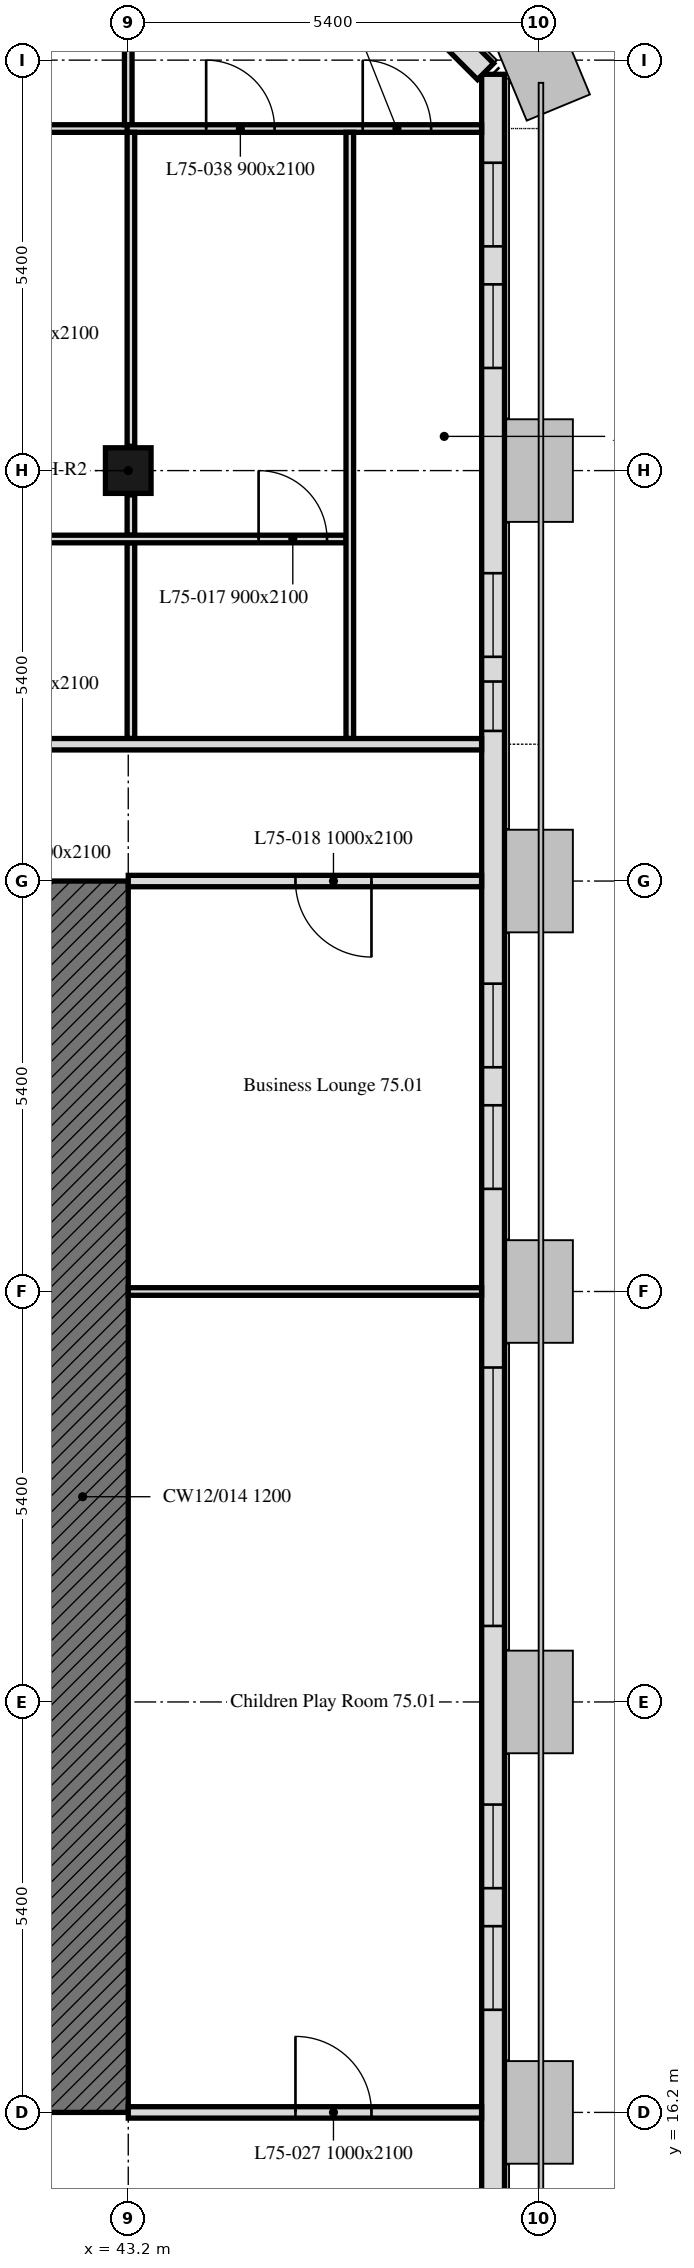
"""IFC4 building model, lengths in metres.
Left out: names, types, materials, properties, quantities, classifications, styles, units other than length and angle.
Written with IfcOpenShell. Run it as: python <this file> out.ifc"""

import sys

from ifc_helpers import new_model, si_unit, direction, frame, frame_2d, origin, origin_2d, place, context, subcontext, project, spatial, rectangle, extrude, element, fill, save


model = new_model("IFC4")
c1 = context("Model", 3, precision=1e-05, world=origin(), true_north=direction((0.0, 1.0)))
c2 = subcontext(c1, "Body", "Model", "MODEL_VIEW")
j1 = project(units=[si_unit("LENGTHUNIT", "METRE"), si_unit("PLANEANGLEUNIT", "RADIAN")], contexts=[c1])
p1 = place(None, origin())
s1 = spatial("IfcSite", under=j1, at=p1, CompositionType="ELEMENT")
p2 = place(p1, origin())
s2 = spatial("IfcBuilding", under=s1, at=p2, CompositionType="ELEMENT")
p3 = place(p2, frame((0.0, 0.0, 301.6)))
s3 = spatial("IfcBuildingStorey", under=s2, at=p3, CompositionType="ELEMENT", Elevation=301.6)
p4 = place(p3, frame((43.2, 37.8, 0.0), z_axis=(0.0, 0.0, 1.0), x_axis=(1.0, 0.0, 0.0)))
e1 = element("IfcColumn", 1, at=p4, inside=s3, PredefinedType="COLUMN", context=c2, shape_type="SweptSolid", body=[
    extrude(rectangle(XDim=0.6, YDim=0.6, at=origin_2d()), origin(), (0.0, 0.0, 1.0), 3.0),
])
p5 = place(p3, frame((48.0, 10.986, 0.0), z_axis=(0.0, 0.0, 1.0), x_axis=(0.0, 1.0, 0.0)))
e2 = element("IfcWall", 2, at=p5, inside=s3, PredefinedType="SOLIDWALL", context=c2, shape_type="SweptSolid", body=[
    extrude(rectangle(XDim=32.027, YDim=0.3, at=frame_2d((16.014, 0.0))), origin(), (0.0, 0.0, 1.0), 3.0),
])
p6 = place(p5, frame((1.314, 0.0, 0.9)))
e3 = element("IfcOpeningElement", 3, at=p6, cuts=e2, PredefinedType="OPENING", context=c2, shape_type="SweptSolid", body=[
    extrude(rectangle(XDim=1.1, YDim=1.7, at=frame_2d((0.55, 0.85))), frame((0.0, 0.16, 0.0), z_axis=(0.0, -1.0, 0.0), x_axis=(1.0, 0.0, 0.0)), (0.0, 0.0, 1.0), 0.32),
])
p7 = place(p5, frame((2.589, 0.0, 0.9)))
e4 = element("IfcOpeningElement", 4, at=p7, cuts=e2, PredefinedType="OPENING", context=c2, shape_type="SweptSolid", body=[
    extrude(rectangle(XDim=0.65, YDim=1.7, at=frame_2d((0.325, 0.85))), frame((0.0, 0.16, 0.0), z_axis=(0.0, -1.0, 0.0), x_axis=(1.0, 0.0, 0.0)), (0.0, 0.0, 1.0), 0.32),
])
p8 = place(p5, frame((6.564, 0.0, 0.9)))
e5 = element("IfcOpeningElement", 5, at=p8, cuts=e2, PredefinedType="OPENING", context=c2, shape_type="SweptSolid", body=[
    extrude(rectangle(XDim=1.1, YDim=1.7, at=frame_2d((0.55, 0.85))), frame((0.0, 0.16, 0.0), z_axis=(0.0, -1.0, 0.0), x_axis=(1.0, 0.0, 0.0)), (0.0, 0.0, 1.0), 0.32),
])
p9 = place(p5, frame((8.164, 0.0, 0.9)))
e6 = element("IfcOpeningElement", 6, at=p9, cuts=e2, PredefinedType="OPENING", context=c2, shape_type="SweptSolid", body=[
    extrude(rectangle(XDim=1.1, YDim=1.7, at=frame_2d((0.55, 0.85))), frame((0.0, 0.16, 0.0), z_axis=(0.0, -1.0, 0.0), x_axis=(1.0, 0.0, 0.0)), (0.0, 0.0, 1.0), 0.32),
])
p10 = place(p5, frame((11.614, 0.0, 0.9)))
e7 = element("IfcOpeningElement", 7, at=p10, cuts=e2, PredefinedType="OPENING", context=c2, shape_type="SweptSolid", body=[
    extrude(rectangle(XDim=3.4, YDim=1.7, at=frame_2d((1.7, 0.85))), frame((0.0, 0.16, 0.0), z_axis=(0.0, -1.0, 0.0), x_axis=(1.0, 0.0, 0.0)), (0.0, 0.0, 1.0), 0.32),
])
p11 = place(p5, frame((17.364, 0.0, 0.9)))
e8 = element("IfcOpeningElement", 8, at=p11, cuts=e2, PredefinedType="OPENING", context=c2, shape_type="SweptSolid", body=[
    extrude(rectangle(XDim=1.1, YDim=1.7, at=frame_2d((0.55, 0.85))), frame((0.0, 0.16, 0.0), z_axis=(0.0, -1.0, 0.0), x_axis=(1.0, 0.0, 0.0)), (0.0, 0.0, 1.0), 0.32),
])
p12 = place(p5, frame((18.964, 0.0, 0.9)))
e9 = element("IfcOpeningElement", 9, at=p12, cuts=e2, PredefinedType="OPENING", context=c2, shape_type="SweptSolid", body=[
    extrude(rectangle(XDim=1.1, YDim=1.7, at=frame_2d((0.55, 0.85))), frame((0.0, 0.16, 0.0), z_axis=(0.0, -1.0, 0.0), x_axis=(1.0, 0.0, 0.0)), (0.0, 0.0, 1.0), 0.32),
])
p13 = place(p5, frame((23.389, 0.0, 0.9)))
e10 = element("IfcOpeningElement", 10, at=p13, cuts=e2, PredefinedType="OPENING", context=c2, shape_type="SweptSolid", body=[
    extrude(rectangle(XDim=0.65, YDim=1.7, at=frame_2d((0.325, 0.85))), frame((0.0, 0.16, 0.0), z_axis=(0.0, -1.0, 0.0), x_axis=(1.0, 0.0, 0.0)), (0.0, 0.0, 1.0), 0.32),
])
p14 = place(p5, frame((24.364, 0.0, 0.9)))
e11 = element("IfcOpeningElement", 11, at=p14, cuts=e2, PredefinedType="OPENING", context=c2, shape_type="SweptSolid", body=[
    extrude(rectangle(XDim=1.1, YDim=1.7, at=frame_2d((0.55, 0.85))), frame((0.0, 0.16, 0.0), z_axis=(0.0, -1.0, 0.0), x_axis=(1.0, 0.0, 0.0)), (0.0, 0.0, 1.0), 0.32),
])
p15 = place(p5, frame((28.164, 0.0, 0.9)))
e12 = element("IfcOpeningElement", 12, at=p15, cuts=e2, PredefinedType="OPENING", context=c2, shape_type="SweptSolid", body=[
    extrude(rectangle(XDim=1.1, YDim=1.7, at=frame_2d((0.55, 0.85))), frame((0.0, 0.16, 0.0), z_axis=(0.0, -1.0, 0.0), x_axis=(1.0, 0.0, 0.0)), (0.0, 0.0, 1.0), 0.32),
])
p16 = place(p5, frame((29.764, 0.0, 0.9)))
e13 = element("IfcOpeningElement", 13, at=p16, cuts=e2, PredefinedType="OPENING", context=c2, shape_type="SweptSolid", body=[
    extrude(rectangle(XDim=1.1, YDim=1.7, at=frame_2d((0.55, 0.85))), frame((0.0, 0.16, 0.0), z_axis=(0.0, -1.0, 0.0), x_axis=(1.0, 0.0, 0.0)), (0.0, 0.0, 1.0), 0.32),
])
p17 = place(p3, frame((47.901, 43.051, 0.0), z_axis=(0.0, 0.0, 1.0), x_axis=(-0.707106781187, 0.707106781187, 0.0)))
e14 = element("IfcWall", 14, at=p17, inside=s3, PredefinedType="SOLIDWALL", context=c2, shape_type="SweptSolid", body=[
    extrude(rectangle(XDim=6.86, YDim=0.3, at=frame_2d((3.43, 0.0))), origin(), (0.0, 0.0, 1.0), 3.0),
])
p18 = place(p17, frame((1.73, 0.0, 0.9)))
e15 = element("IfcOpeningElement", 15, at=p18, cuts=e14, PredefinedType="OPENING", context=c2, shape_type="SweptSolid", body=[
    extrude(rectangle(XDim=3.4, YDim=1.7, at=frame_2d((1.7, 0.85))), frame((0.0, 0.16, 0.0), z_axis=(0.0, -1.0, 0.0), x_axis=(1.0, 0.0, 0.0)), (0.0, 0.0, 1.0), 0.32),
])
p19 = place(p3, frame((42.6, 32.4, 0.0), z_axis=(0.0, 0.0, 1.0), x_axis=(0.0, -1.0, 0.0)))
e16 = element("IfcWall", 16, at=p19, inside=s3, PredefinedType="SOLIDWALL", context=c2, shape_type="SweptSolid", body=[
    extrude(rectangle(XDim=16.2, YDim=1.2, at=frame_2d((8.1, 0.0))), origin(), (0.0, 0.0, 1.0), 3.0),
])
p20 = place(p3, frame((37.85, 42.3, 0.0), z_axis=(0.0, 0.0, 1.0), x_axis=(1.0, 0.0, 0.0)))
e17 = element("IfcWall", 17, at=p20, inside=s3, PredefinedType="PARTITIONING", context=c2, shape_type="SweptSolid", body=[
    extrude(rectangle(XDim=5.4, YDim=0.1, at=frame_2d((2.7, 0.0))), origin(), (0.0, 0.0, 1.0), 3.0),
])
p21 = place(p20, frame((1.335, 0.0, 0.0)))
e18 = element("IfcOpeningElement", 18, at=p21, cuts=e17, PredefinedType="OPENING", context=c2, shape_type="SweptSolid", body=[
    extrude(rectangle(XDim=0.9, YDim=2.1, at=frame_2d((0.45, 1.05))), frame((0.0, 0.05, 0.0), z_axis=(0.0, -1.0, 0.0), x_axis=(1.0, 0.0, 0.0)), (0.0, 0.0, 1.0), 0.1),
])
p22 = place(p3, frame((43.2, 42.35, 0.0), z_axis=(0.0, 0.0, 1.0), x_axis=(0.0, 1.0, 0.0)))
e19 = element("IfcWall", 19, at=p22, inside=s3, PredefinedType="PARTITIONING", context=c2, shape_type="SweptSolid", body=[
    extrude(rectangle(XDim=5.138, YDim=0.1, at=frame_2d((2.569, 0.0))), origin(), (0.0, 0.0, 1.0), 3.0),
])
p23 = place(p22, frame((2.65, 0.0, 0.0)))
e20 = element("IfcOpeningElement", 20, at=p23, cuts=e19, PredefinedType="OPENING", context=c2, shape_type="SweptSolid", body=[
    extrude(rectangle(XDim=0.9, YDim=2.1, at=frame_2d((0.45, 1.05))), frame((0.0, 0.05, 0.0), z_axis=(0.0, -1.0, 0.0), x_axis=(1.0, 0.0, 0.0)), (0.0, 0.0, 1.0), 0.1),
])
p24 = place(p3, frame((43.185, 42.3, 0.0), z_axis=(0.0, 0.0, 1.0), x_axis=(1.0, 0.0, 0.0)))
e21 = element("IfcWall", 21, at=p24, inside=s3, PredefinedType="PARTITIONING", context=c2, shape_type="SweptSolid", body=[
    extrude(rectangle(XDim=4.664, YDim=0.1, at=frame_2d((2.332, 0.0))), origin(), (0.0, 0.0, 1.0), 3.0),
])
p25 = place(p24, frame((3.1, 0.0, 0.0)))
e22 = element("IfcOpeningElement", 22, at=p25, cuts=e21, PredefinedType="OPENING", context=c2, shape_type="SweptSolid", body=[
    extrude(rectangle(XDim=0.9, YDim=2.1, at=frame_2d((0.45, 1.05))), frame((0.0, 0.05, 0.0), z_axis=(0.0, -1.0, 0.0), x_axis=(1.0, 0.0, 0.0)), (0.0, 0.0, 1.0), 0.1),
])
p26 = place(p24, frame((1.04, 0.0, 0.0)))
e23 = element("IfcOpeningElement", 23, at=p26, cuts=e21, PredefinedType="OPENING", context=c2, shape_type="SweptSolid", body=[
    extrude(rectangle(XDim=0.9, YDim=2.1, at=frame_2d((0.45, 1.05))), frame((0.0, 0.05, 0.0), z_axis=(0.0, -1.0, 0.0), x_axis=(1.0, 0.0, 0.0)), (0.0, 0.0, 1.0), 0.1),
])
p27 = place(p3, frame((43.235, 36.95, 0.0), z_axis=(0.0, 0.0, 1.0), x_axis=(0.0, 1.0, 0.0)))
e24 = element("IfcWall", 24, at=p27, inside=s3, PredefinedType="PARTITIONING", context=c2, shape_type="SweptSolid", body=[
    extrude(rectangle(XDim=0.53, YDim=0.1, at=frame_2d((0.265, 0.0))), origin(), (0.0, 0.0, 1.0), 3.0),
])
p28 = place(p3, frame((43.235, 38.12, 0.0), z_axis=(0.0, 0.0, 1.0), x_axis=(0.0, 1.0, 0.0)))
e25 = element("IfcWall", 25, at=p28, inside=s3, PredefinedType="PARTITIONING", context=c2, shape_type="SweptSolid", body=[
    extrude(rectangle(XDim=4.13, YDim=0.1, at=frame_2d((2.065, 0.0))), origin(), (0.0, 0.0, 1.0), 3.0),
])
p29 = place(p3, frame((43.235, 34.275, 0.0), z_axis=(0.0, 0.0, 1.0), x_axis=(0.0, 1.0, 0.0)))
e26 = element("IfcWall", 26, at=p29, inside=s3, PredefinedType="PARTITIONING", context=c2, shape_type="SweptSolid", body=[
    extrude(rectangle(XDim=2.575, YDim=0.1, at=frame_2d((1.288, 0.0))), origin(), (0.0, 0.0, 1.0), 3.0),
])
p30 = place(p3, frame((40.435, 36.9, 0.0), z_axis=(0.0, 0.0, 1.0), x_axis=(1.0, 0.0, 0.0)))
e27 = element("IfcWall", 27, at=p30, inside=s3, PredefinedType="PARTITIONING", context=c2, shape_type="SweptSolid", body=[
    extrude(rectangle(XDim=5.63, YDim=0.1, at=frame_2d((2.815, 0.0))), origin(), (0.0, 0.0, 1.0), 3.0),
])
p31 = place(p30, frame((4.48, 0.0, 0.0)))
e28 = element("IfcOpeningElement", 28, at=p31, cuts=e27, PredefinedType="OPENING", context=c2, shape_type="SweptSolid", body=[
    extrude(rectangle(XDim=0.9, YDim=2.1, at=frame_2d((0.45, 1.05))), frame((0.0, 0.05, 0.0), z_axis=(0.0, -1.0, 0.0), x_axis=(1.0, 0.0, 0.0)), (0.0, 0.0, 1.0), 0.1),
])
p32 = place(p3, frame((46.115, 34.275, 0.0), z_axis=(0.0, 0.0, 1.0), x_axis=(0.0, 1.0, 0.0)))
e29 = element("IfcWall", 29, at=p32, inside=s3, PredefinedType="PARTITIONING", context=c2, shape_type="SweptSolid", body=[
    extrude(rectangle(XDim=7.975, YDim=0.1, at=frame_2d((3.988, 0.0))), origin(), (0.0, 0.0, 1.0), 2.4),
])
p33 = place(p3, frame((6.151, 34.2, 0.0), z_axis=(0.0, 0.0, 1.0), x_axis=(1.0, 0.0, 0.0)))
e30 = element("IfcWall", 30, at=p33, inside=s3, PredefinedType="PARTITIONING", context=c2, shape_type="SweptSolid", body=[
    extrude(rectangle(XDim=41.698, YDim=0.15, at=frame_2d((20.849, 0.0))), origin(), (0.0, 0.0, 1.0), 2.4),
])
p34 = place(p33, frame((2.939, 0.0, 0.0)))
e31 = element("IfcOpeningElement", 31, at=p34, cuts=e30, PredefinedType="OPENING", context=c2, shape_type="SweptSolid", body=[
    extrude(rectangle(XDim=1.0, YDim=2.1, at=frame_2d((0.5, 1.05))), frame((0.0, 0.075, 0.0), z_axis=(0.0, -1.0, 0.0), x_axis=(1.0, 0.0, 0.0)), (0.0, 0.0, 1.0), 0.15),
])
p35 = place(p33, frame((18.121, 0.0, 0.0)))
e32 = element("IfcOpeningElement", 32, at=p35, cuts=e30, PredefinedType="OPENING", context=c2, shape_type="SweptSolid", body=[
    extrude(rectangle(XDim=1.0, YDim=2.1, at=frame_2d((0.5, 1.05))), frame((0.0, 0.075, 0.0), z_axis=(0.0, -1.0, 0.0), x_axis=(1.0, 0.0, 0.0)), (0.0, 0.0, 1.0), 0.15),
])
p36 = place(p33, frame((32.359, 0.0, 0.0)))
e33 = element("IfcOpeningElement", 33, at=p36, cuts=e30, PredefinedType="OPENING", context=c2, shape_type="SweptSolid", body=[
    extrude(rectangle(XDim=1.0, YDim=2.1, at=frame_2d((0.5, 1.05))), frame((0.0, 0.075, 0.0), z_axis=(0.0, -1.0, 0.0), x_axis=(1.0, 0.0, 0.0)), (0.0, 0.0, 1.0), 0.15),
])
p37 = place(p3, frame((47.849, 32.4, 0.0), z_axis=(0.0, 0.0, 1.0), x_axis=(-1.0, 0.0, 0.0)))
e34 = element("IfcWall", 34, at=p37, inside=s3, PredefinedType="PARTITIONING", context=c2, shape_type="SweptSolid", body=[
    extrude(rectangle(XDim=4.649, YDim=0.15, at=frame_2d((2.325, 0.0))), origin(), (0.0, 0.0, 1.0), 2.4),
])
p38 = place(p37, frame((1.449, 0.0, 0.0)))
e35 = element("IfcOpeningElement", 35, at=p38, cuts=e34, PredefinedType="OPENING", context=c2, shape_type="SweptSolid", body=[
    extrude(rectangle(XDim=1.0, YDim=2.1, at=frame_2d((0.5, 1.05))), frame((0.0, 0.075, 0.0), z_axis=(0.0, -1.0, 0.0), x_axis=(1.0, 0.0, 0.0)), (0.0, 0.0, 1.0), 0.15),
])
p39 = place(p3, frame((43.2, 27.0, 0.0), z_axis=(0.0, 0.0, 1.0), x_axis=(1.0, 0.0, 0.0)))
e36 = element("IfcWall", 36, at=p39, inside=s3, PredefinedType="PARTITIONING", context=c2, shape_type="SweptSolid", body=[
    extrude(rectangle(XDim=4.649, YDim=0.1, at=frame_2d((2.325, 0.0))), origin(), (0.0, 0.0, 1.0), 2.4),
])
p40 = place(p3, frame((43.2, 16.2, 0.0), z_axis=(0.0, 0.0, 1.0), x_axis=(1.0, 0.0, 0.0)))
e37 = element("IfcWall", 37, at=p40, inside=s3, PredefinedType="PARTITIONING", context=c2, shape_type="SweptSolid", body=[
    extrude(rectangle(XDim=4.649, YDim=0.15, at=frame_2d((2.325, 0.0))), origin(), (0.0, 0.0, 1.0), 2.4),
])
p41 = place(p40, frame((2.2, 0.0, 0.0)))
e38 = element("IfcOpeningElement", 38, at=p41, cuts=e37, PredefinedType="OPENING", context=c2, shape_type="SweptSolid", body=[
    extrude(rectangle(XDim=1.0, YDim=2.1, at=frame_2d((0.5, 1.05))), frame((0.0, 0.075, 0.0), z_axis=(0.0, -1.0, 0.0), x_axis=(1.0, 0.0, 0.0)), (0.0, 0.0, 1.0), 0.15),
])
p42 = place(p8, origin())
e39 = element("IfcWindow", 39, at=p42, inside=s3, PartitioningType="SINGLE_PANEL", PredefinedType="WINDOW", context=c2, shape_type="SweptSolid", body=[
    extrude(rectangle(XDim=1.1, YDim=1.7, at=frame_2d((0.55, 0.85))), frame((0.0, 0.03, 0.0), z_axis=(0.0, -1.0, 0.0), x_axis=(1.0, 0.0, 0.0)), (0.0, 0.0, 1.0), 0.06),
])
fill(e5, e39)
p43 = place(p9, origin())
e40 = element("IfcWindow", 40, at=p43, inside=s3, PartitioningType="SINGLE_PANEL", PredefinedType="WINDOW", context=c2, shape_type="SweptSolid", body=[
    extrude(rectangle(XDim=1.1, YDim=1.7, at=frame_2d((0.55, 0.85))), frame((0.0, 0.03, 0.0), z_axis=(0.0, -1.0, 0.0), x_axis=(1.0, 0.0, 0.0)), (0.0, 0.0, 1.0), 0.06),
])
fill(e6, e40)
p44 = place(p10, origin())
e41 = element("IfcWindow", 41, at=p44, inside=s3, PartitioningType="SINGLE_PANEL", PredefinedType="WINDOW", context=c2, shape_type="SweptSolid", body=[
    extrude(rectangle(XDim=3.4, YDim=1.7, at=frame_2d((1.7, 0.85))), frame((0.0, 0.03, 0.0), z_axis=(0.0, -1.0, 0.0), x_axis=(1.0, 0.0, 0.0)), (0.0, 0.0, 1.0), 0.06),
])
fill(e7, e41)
p45 = place(p11, origin())
e42 = element("IfcWindow", 42, at=p45, inside=s3, PartitioningType="SINGLE_PANEL", PredefinedType="WINDOW", context=c2, shape_type="SweptSolid", body=[
    extrude(rectangle(XDim=1.1, YDim=1.7, at=frame_2d((0.55, 0.85))), frame((0.0, 0.03, 0.0), z_axis=(0.0, -1.0, 0.0), x_axis=(1.0, 0.0, 0.0)), (0.0, 0.0, 1.0), 0.06),
])
fill(e8, e42)
p46 = place(p12, origin())
e43 = element("IfcWindow", 43, at=p46, inside=s3, PartitioningType="SINGLE_PANEL", PredefinedType="WINDOW", context=c2, shape_type="SweptSolid", body=[
    extrude(rectangle(XDim=1.1, YDim=1.7, at=frame_2d((0.55, 0.85))), frame((0.0, 0.03, 0.0), z_axis=(0.0, -1.0, 0.0), x_axis=(1.0, 0.0, 0.0)), (0.0, 0.0, 1.0), 0.06),
])
fill(e9, e43)
p47 = place(p13, origin())
e44 = element("IfcWindow", 44, at=p47, inside=s3, PartitioningType="SINGLE_PANEL", PredefinedType="WINDOW", context=c2, shape_type="SweptSolid", body=[
    extrude(rectangle(XDim=0.65, YDim=1.7, at=frame_2d((0.325, 0.85))), frame((0.0, 0.03, 0.0), z_axis=(0.0, -1.0, 0.0), x_axis=(1.0, 0.0, 0.0)), (0.0, 0.0, 1.0), 0.06),
])
fill(e10, e44)
p48 = place(p14, origin())
e45 = element("IfcWindow", 45, at=p48, inside=s3, PartitioningType="SINGLE_PANEL", PredefinedType="WINDOW", context=c2, shape_type="SweptSolid", body=[
    extrude(rectangle(XDim=1.1, YDim=1.7, at=frame_2d((0.55, 0.85))), frame((0.0, 0.03, 0.0), z_axis=(0.0, -1.0, 0.0), x_axis=(1.0, 0.0, 0.0)), (0.0, 0.0, 1.0), 0.06),
])
fill(e11, e45)
p49 = place(p15, origin())
e46 = element("IfcWindow", 46, at=p49, inside=s3, PartitioningType="SINGLE_PANEL", PredefinedType="WINDOW", context=c2, shape_type="SweptSolid", body=[
    extrude(rectangle(XDim=1.1, YDim=1.7, at=frame_2d((0.55, 0.85))), frame((0.0, 0.03, 0.0), z_axis=(0.0, -1.0, 0.0), x_axis=(1.0, 0.0, 0.0)), (0.0, 0.0, 1.0), 0.06),
])
fill(e12, e46)
p50 = place(p16, origin())
e47 = element("IfcWindow", 47, at=p50, inside=s3, PartitioningType="SINGLE_PANEL", PredefinedType="WINDOW", context=c2, shape_type="SweptSolid", body=[
    extrude(rectangle(XDim=1.1, YDim=1.7, at=frame_2d((0.55, 0.85))), frame((0.0, 0.03, 0.0), z_axis=(0.0, -1.0, 0.0), x_axis=(1.0, 0.0, 0.0)), (0.0, 0.0, 1.0), 0.06),
])
fill(e13, e47)
p51 = place(p25, origin())
e48 = element("IfcDoor", 48, at=p51, inside=s3, OperationType="SINGLE_SWING_LEFT", PredefinedType="DOOR", context=c2, shape_type="SweptSolid", body=[
    extrude(rectangle(XDim=0.9, YDim=2.1, at=frame_2d((0.45, 1.05))), frame((0.0, 0.025, 0.0), z_axis=(0.0, -1.0, 0.0), x_axis=(1.0, 0.0, 0.0)), (0.0, 0.0, 1.0), 0.05),
])
fill(e22, e48)
p52 = place(p31, origin())
e49 = element("IfcDoor", 49, at=p52, inside=s3, OperationType="SINGLE_SWING_LEFT", PredefinedType="DOOR", context=c2, shape_type="SweptSolid", body=[
    extrude(rectangle(XDim=0.9, YDim=2.1, at=frame_2d((0.45, 1.05))), frame((0.0, 0.025, 0.0), z_axis=(0.0, -1.0, 0.0), x_axis=(1.0, 0.0, 0.0)), (0.0, 0.0, 1.0), 0.05),
])
fill(e28, e49)
p53 = place(p38, origin())
e50 = element("IfcDoor", 50, at=p53, inside=s3, OperationType="SINGLE_SWING_RIGHT", PredefinedType="DOOR", context=c2, shape_type="SweptSolid", body=[
    extrude(rectangle(XDim=1.0, YDim=2.1, at=frame_2d((0.5, 1.05))), frame((0.0, 0.025, 0.0), z_axis=(0.0, -1.0, 0.0), x_axis=(1.0, 0.0, 0.0)), (0.0, 0.0, 1.0), 0.05),
])
fill(e35, e50)
p54 = place(p41, origin())
e51 = element("IfcDoor", 51, at=p54, inside=s3, OperationType="SINGLE_SWING_RIGHT", PredefinedType="DOOR", context=c2, shape_type="SweptSolid", body=[
    extrude(rectangle(XDim=1.0, YDim=2.1, at=frame_2d((0.5, 1.05))), frame((0.0, 0.025, 0.0), z_axis=(0.0, -1.0, 0.0), x_axis=(1.0, 0.0, 0.0)), (0.0, 0.0, 1.0), 0.05),
])
fill(e38, e51)
p55 = place(p26, origin())
e52 = element("IfcDoor", 52, at=p55, inside=s3, OperationType="SINGLE_SWING_RIGHT", PredefinedType="DOOR", context=c2, shape_type="SweptSolid", body=[
    extrude(rectangle(XDim=0.9, YDim=2.1, at=frame_2d((0.45, 1.05))), frame((0.0, 0.025, 0.0), z_axis=(0.0, -1.0, 0.0), x_axis=(1.0, 0.0, 0.0)), (0.0, 0.0, 1.0), 0.05),
])
fill(e23, e52)
save(model, sys.argv[1])
